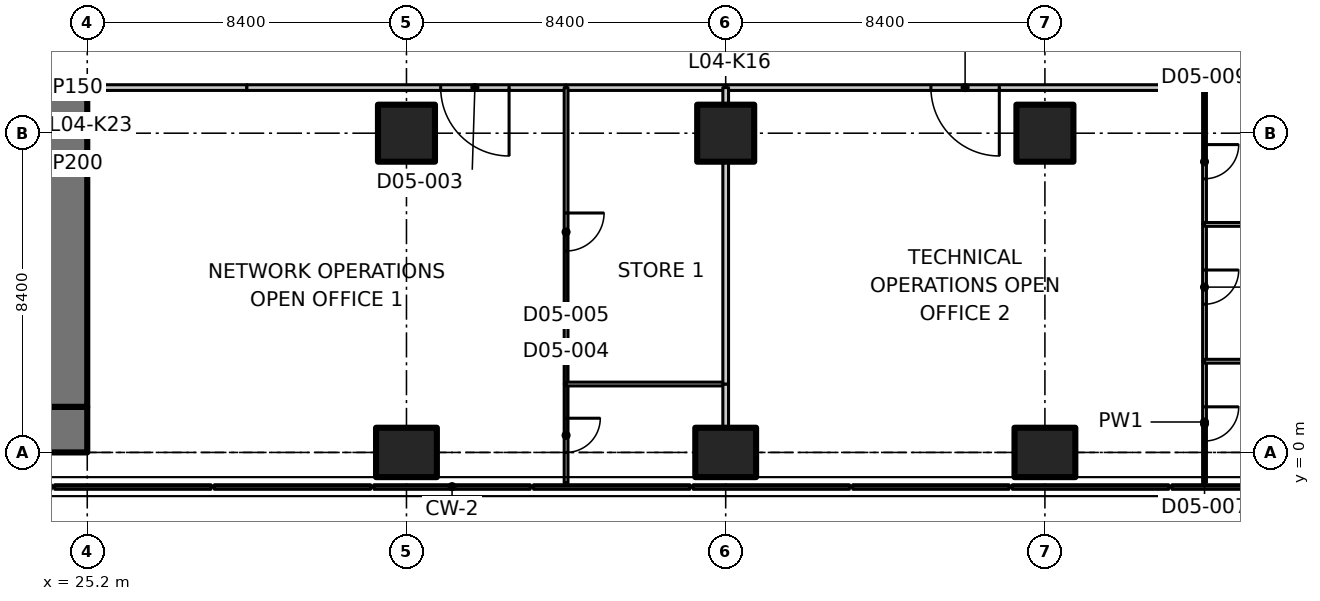
"""IFC4 building model, lengths in metres.
Left out: names, types, materials, properties, quantities, classifications, styles, units other than length and angle.
Written with IfcOpenShell. Run it as: python <this file> out.ifc"""

import sys

from ifc_helpers import new_model, si_unit, direction, frame, frame_2d, origin, origin_2d, place, context, subcontext, project, spatial, polyline, rectangle, outline, extrude, element, fill, save


model = new_model("IFC4")
c1 = context("Model", 3, precision=1e-05, world=origin(), true_north=direction((0.0, 1.0)))
c2 = subcontext(c1, "Body", "Model", "MODEL_VIEW")
j1 = project(units=[si_unit("LENGTHUNIT", "METRE"), si_unit("PLANEANGLEUNIT", "RADIAN")], contexts=[c1])
p1 = place(None, origin())
s1 = spatial("IfcSite", under=j1, at=p1, CompositionType="ELEMENT")
p2 = place(p1, origin())
s2 = spatial("IfcBuilding", under=s1, at=p2, CompositionType="ELEMENT")
p3 = place(p2, frame((0.0, 0.0, 27.5)))
s3 = spatial("IfcBuildingStorey", under=s2, at=p3, CompositionType="ELEMENT", Elevation=27.5)
p4 = place(p3, frame((33.6, 0.0, 0.0), z_axis=(0.0, 0.0, 1.0), x_axis=(0.0, 1.0, 0.0)))
e1 = element("IfcColumn", 1, at=p4, inside=s3, PredefinedType="COLUMN", context=c2, shape_type="SweptSolid", body=[
    extrude(rectangle(XDim=1.3, YDim=1.6, at=origin_2d()), origin(), (0.0, 0.0, 1.0), 4.25),
])
p5 = place(p3, frame((33.6, 8.4, 0.0), z_axis=(0.0, 0.0, 1.0), x_axis=(1.0, 0.0, 0.0)))
e2 = element("IfcColumn", 2, at=p5, inside=s3, PredefinedType="COLUMN", context=c2, shape_type="SweptSolid", body=[
    extrude(rectangle(XDim=1.5, YDim=1.5, at=origin_2d()), origin(), (0.0, 0.0, 1.0), 4.25),
])
p6 = place(p3, frame((42.0, 0.0, 0.0), z_axis=(0.0, 0.0, 1.0), x_axis=(0.0, 1.0, 0.0)))
e3 = element("IfcColumn", 3, at=p6, inside=s3, PredefinedType="COLUMN", context=c2, shape_type="SweptSolid", body=[
    extrude(rectangle(XDim=1.3, YDim=1.6, at=origin_2d()), origin(), (0.0, 0.0, 1.0), 4.25),
])
p7 = place(p3, frame((42.0, 8.4, 0.0), z_axis=(0.0, 0.0, 1.0), x_axis=(1.0, 0.0, 0.0)))
e4 = element("IfcColumn", 4, at=p7, inside=s3, PredefinedType="COLUMN", context=c2, shape_type="SweptSolid", body=[
    extrude(rectangle(XDim=1.5, YDim=1.5, at=origin_2d()), origin(), (0.0, 0.0, 1.0), 4.25),
])
p8 = place(p3, frame((50.4, 0.0, 0.0), z_axis=(0.0, 0.0, 1.0), x_axis=(0.0, 1.0, 0.0)))
e5 = element("IfcColumn", 5, at=p8, inside=s3, PredefinedType="COLUMN", context=c2, shape_type="SweptSolid", body=[
    extrude(rectangle(XDim=1.3, YDim=1.6, at=origin_2d()), origin(), (0.0, 0.0, 1.0), 4.25),
])
p9 = place(p3, frame((50.4, 8.4, 0.0), z_axis=(0.0, 0.0, 1.0), x_axis=(1.0, 0.0, 0.0)))
e6 = element("IfcColumn", 6, at=p9, inside=s3, PredefinedType="COLUMN", context=c2, shape_type="SweptSolid", body=[
    extrude(rectangle(XDim=1.5, YDim=1.5, at=origin_2d()), origin(), (0.0, 0.0, 1.0), 4.25),
])
p10 = place(p3, origin())
e7 = element("IfcWall", 7, at=p10, inside=s3, PredefinedType="SOLIDWALL", context=c2, shape_type="SweptSolid", body=[
    extrude(outline(polyline([(28.455, -0.97), (28.455, -0.85), (24.345, -0.85), (24.345, -0.97), (28.455, -0.97)])), origin(), (0.0, 0.0, 1.0), 4.25),
])
p11 = place(p3, origin())
e8 = element("IfcWall", 8, at=p11, inside=s3, PredefinedType="SOLIDWALL", context=c2, shape_type="SweptSolid", body=[
    extrude(outline(polyline([(32.655, -0.97), (32.655, -0.85), (28.545, -0.85), (28.545, -0.97), (32.655, -0.97)])), origin(), (0.0, 0.0, 1.0), 4.25),
])
p12 = place(p3, origin())
e9 = element("IfcWall", 9, at=p12, inside=s3, PredefinedType="SOLIDWALL", context=c2, shape_type="SweptSolid", body=[
    extrude(outline(polyline([(36.855, -0.97), (36.855, -0.85), (32.745, -0.85), (32.745, -0.97), (36.855, -0.97)])), origin(), (0.0, 0.0, 1.0), 4.25),
])
p13 = place(p3, origin())
e10 = element("IfcWall", 10, at=p13, inside=s3, PredefinedType="SOLIDWALL", context=c2, shape_type="SweptSolid", body=[
    extrude(outline(polyline([(41.055, -0.97), (41.055, -0.85), (36.945, -0.85), (36.945, -0.97), (41.055, -0.97)])), origin(), (0.0, 0.0, 1.0), 4.25),
])
p14 = place(p3, origin())
e11 = element("IfcWall", 11, at=p14, inside=s3, PredefinedType="SOLIDWALL", context=c2, shape_type="SweptSolid", body=[
    extrude(outline(polyline([(45.255, -0.97), (45.255, -0.85), (41.145, -0.85), (41.145, -0.97), (45.255, -0.97)])), origin(), (0.0, 0.0, 1.0), 4.25),
])
p15 = place(p3, origin())
e12 = element("IfcWall", 12, at=p15, inside=s3, PredefinedType="SOLIDWALL", context=c2, shape_type="SweptSolid", body=[
    extrude(outline(polyline([(49.455, -0.97), (49.455, -0.85), (45.345, -0.85), (45.345, -0.97), (49.455, -0.97)])), origin(), (0.0, 0.0, 1.0), 4.25),
])
p16 = place(p3, origin())
e13 = element("IfcWall", 13, at=p16, inside=s3, PredefinedType="SOLIDWALL", context=c2, shape_type="SweptSolid", body=[
    extrude(outline(polyline([(53.655, -0.97), (53.655, -0.85), (49.545, -0.85), (49.545, -0.97), (53.655, -0.97)])), origin(), (0.0, 0.0, 1.0), 4.25),
])
p17 = place(p3, origin())
e14 = element("IfcWall", 14, at=p17, inside=s3, PredefinedType="SOLIDWALL", context=c2, shape_type="SweptSolid", body=[
    extrude(outline(polyline([(57.855, -0.97), (57.855, -0.85), (53.745, -0.85), (53.745, -0.97), (57.855, -0.97)])), origin(), (0.0, 0.0, 1.0), 4.25),
])
p18 = place(p3, frame((6.736, 0.6, 0.0), z_axis=(0.0, 0.0, 1.0), x_axis=(1.0, 0.0, 0.0)))
e15 = element("IfcWall", 15, at=p18, inside=s3, PredefinedType="SHEAR", context=c2, shape_type="SweptSolid", body=[
    extrude(rectangle(XDim=18.464, YDim=1.2, at=frame_2d((9.232, 0.0))), origin(), (0.0, 0.0, 1.0), 4.25),
])
p19 = place(p3, frame((24.6, 1.2, 0.0), z_axis=(0.0, 0.0, 1.0), x_axis=(0.0, 1.0, 0.0)))
e16 = element("IfcWall", 16, at=p19, inside=s3, PredefinedType="SHEAR", context=c2, shape_type="SweptSolid", body=[
    extrude(rectangle(XDim=8.6, YDim=1.2, at=frame_2d((4.3, 0.0))), origin(), (0.0, 0.0, 1.0), 4.25),
])
p20 = place(p3, frame((29.4, 9.6, 0.0), z_axis=(0.0, 0.0, 1.0), x_axis=(-1.0, 0.0, 0.0)))
e17 = element("IfcWall", 17, at=p20, inside=s3, PredefinedType="PARTITIONING", context=c2, shape_type="SweptSolid", body=[
    extrude(rectangle(XDim=4.2, YDim=0.15, at=frame_2d((2.1, 0.0))), origin(), (0.0, 0.0, 1.0), 4.23),
])
p21 = place(p3, frame((37.8, 9.6, 0.0), z_axis=(0.0, 0.0, 1.0), x_axis=(-1.0, 0.0, 0.0)))
e18 = element("IfcWall", 18, at=p21, inside=s3, PredefinedType="PARTITIONING", context=c2, shape_type="SweptSolid", body=[
    extrude(rectangle(XDim=8.4, YDim=0.15, at=frame_2d((4.2, 0.0))), origin(), (0.0, 0.0, 1.0), 4.23),
])
p22 = place(p21, frame((1.5, 0.0, 0.0)))
e19 = element("IfcOpeningElement", 19, at=p22, cuts=e18, PredefinedType="OPENING", context=c2, shape_type="SweptSolid", body=[
    extrude(rectangle(XDim=1.8, YDim=2.1, at=frame_2d((0.9, 1.05))), frame((0.0, 0.085, 0.0), z_axis=(0.0, -1.0, 0.0), x_axis=(1.0, 0.0, 0.0)), (0.0, 0.0, 1.0), 0.17),
])
p23 = place(p3, frame((42.0, 9.6, 0.0), z_axis=(0.0, 0.0, 1.0), x_axis=(-1.0, 0.0, 0.0)))
e20 = element("IfcWall", 20, at=p23, inside=s3, PredefinedType="PARTITIONING", context=c2, shape_type="SweptSolid", body=[
    extrude(rectangle(XDim=4.2, YDim=0.15, at=frame_2d((2.1, 0.0))), origin(), (0.0, 0.0, 1.0), 4.23),
])
p24 = place(p3, frame((54.6, 9.6, 0.0), z_axis=(0.0, 0.0, 1.0), x_axis=(-1.0, 0.0, 0.0)))
e21 = element("IfcWall", 21, at=p24, inside=s3, PredefinedType="PARTITIONING", context=c2, shape_type="SweptSolid", body=[
    extrude(rectangle(XDim=12.6, YDim=0.15, at=frame_2d((6.3, 0.0))), origin(), (0.0, 0.0, 1.0), 4.23),
])
p25 = place(p24, frame((5.4, 0.0, 0.0)))
e22 = element("IfcOpeningElement", 22, at=p25, cuts=e21, PredefinedType="OPENING", context=c2, shape_type="SweptSolid", body=[
    extrude(rectangle(XDim=1.8, YDim=2.1, at=frame_2d((0.9, 1.05))), frame((0.0, 0.085, 0.0), z_axis=(0.0, -1.0, 0.0), x_axis=(1.0, 0.0, 0.0)), (0.0, 0.0, 1.0), 0.17),
])
p26 = place(p3, frame((58.0, 9.6, 0.0), z_axis=(0.0, 0.0, 1.0), x_axis=(-1.0, 0.0, 0.0)))
e23 = element("IfcWall", 23, at=p26, inside=s3, PredefinedType="PARTITIONING", context=c2, shape_type="SweptSolid", body=[
    extrude(rectangle(XDim=3.4, YDim=0.15, at=frame_2d((1.7, 0.0))), origin(), (0.0, 0.0, 1.0), 4.23),
])
p27 = place(p3, frame((37.8, 1.8, 0.0), z_axis=(0.0, 0.0, 1.0), x_axis=(0.0, -1.0, 0.0)))
e24 = element("IfcWall", 24, at=p27, inside=s3, PredefinedType="PARTITIONING", context=c2, shape_type="SweptSolid", body=[
    extrude(rectangle(XDim=2.598, YDim=0.1, at=frame_2d((1.299, 0.0))), origin(), (0.0, 0.0, 1.0), 3.88),
])
p28 = place(p27, frame((0.9, 0.0, 0.0)))
e25 = element("IfcOpeningElement", 25, at=p28, cuts=e24, PredefinedType="OPENING", context=c2, shape_type="SweptSolid", body=[
    extrude(rectangle(XDim=0.9, YDim=2.1, at=frame_2d((0.45, 1.05))), frame((0.0, 0.06, 0.0), z_axis=(0.0, -1.0, 0.0), x_axis=(1.0, 0.0, 0.0)), (0.0, 0.0, 1.0), 0.12),
])
p29 = place(p3, frame((37.8, 9.6, 0.0), z_axis=(0.0, 0.0, 1.0), x_axis=(0.0, -1.0, 0.0)))
e26 = element("IfcWall", 26, at=p29, inside=s3, PredefinedType="PARTITIONING", context=c2, shape_type="SweptSolid", body=[
    extrude(rectangle(XDim=7.8, YDim=0.1, at=frame_2d((3.9, 0.0))), origin(), (0.0, 0.0, 1.0), 4.23),
])
p30 = place(p29, frame((3.3, 0.0, 0.0)))
e27 = element("IfcOpeningElement", 27, at=p30, cuts=e26, PredefinedType="OPENING", context=c2, shape_type="SweptSolid", body=[
    extrude(rectangle(XDim=1.0, YDim=2.1, at=frame_2d((0.5, 1.05))), frame((0.0, 0.06, 0.0), z_axis=(0.0, -1.0, 0.0), x_axis=(1.0, 0.0, 0.0)), (0.0, 0.0, 1.0), 0.12),
])
p31 = place(p3, frame((37.8, 1.8, 0.0), z_axis=(0.0, 0.0, 1.0), x_axis=(1.0, 0.0, 0.0)))
e28 = element("IfcWall", 28, at=p31, inside=s3, PredefinedType="PARTITIONING", context=c2, shape_type="SweptSolid", body=[
    extrude(rectangle(XDim=4.2, YDim=0.1, at=frame_2d((2.1, 0.0))), origin(), (0.0, 0.0, 1.0), 4.23),
])
p32 = place(p3, frame((42.0, 1.8, 0.0), z_axis=(0.0, 0.0, 1.0), x_axis=(0.0, -1.0, 0.0)))
e29 = element("IfcWall", 29, at=p32, inside=s3, PredefinedType="PARTITIONING", context=c2, shape_type="SweptSolid", body=[
    extrude(rectangle(XDim=1.13, YDim=0.15, at=frame_2d((0.565, 0.0))), origin(), (0.0, 0.0, 1.0), 4.23),
])
p33 = place(p3, frame((42.0, 9.6, 0.0), z_axis=(0.0, 0.0, 1.0), x_axis=(0.0, -1.0, 0.0)))
e30 = element("IfcWall", 30, at=p33, inside=s3, PredefinedType="PARTITIONING", context=c2, shape_type="SweptSolid", body=[
    extrude(rectangle(XDim=0.43, YDim=0.15, at=frame_2d((0.215, 0.0))), origin(), (0.0, 0.0, 1.0), 4.23),
])
p34 = place(p3, frame((42.0, 7.63, 0.0), z_axis=(0.0, 0.0, 1.0), x_axis=(0.0, -1.0, 0.0)))
e31 = element("IfcWall", 31, at=p34, inside=s3, PredefinedType="PARTITIONING", context=c2, shape_type="SweptSolid", body=[
    extrude(rectangle(XDim=5.83, YDim=0.15, at=frame_2d((2.915, 0.0))), origin(), (0.0, 0.0, 1.0), 4.23),
])
p35 = place(p3, frame((54.6, 2.4, 0.0), z_axis=(0.0, 0.0, 1.0), x_axis=(0.0, -1.0, 0.0)))
e32 = element("IfcWall", 32, at=p35, inside=s3, PredefinedType="PARTITIONING", context=c2, shape_type="SweptSolid", body=[
    extrude(rectangle(XDim=3.198, YDim=0.1, at=frame_2d((1.599, 0.0))), origin(), (0.0, 0.0, 1.0), 3.88),
])
p36 = place(p35, frame((1.2, 0.0, 0.0)))
e33 = element("IfcOpeningElement", 33, at=p36, cuts=e32, PredefinedType="OPENING", context=c2, shape_type="SweptSolid", body=[
    extrude(rectangle(XDim=0.9, YDim=2.1, at=frame_2d((0.45, 1.05))), frame((0.0, 0.06, 0.0), z_axis=(0.0, -1.0, 0.0), x_axis=(1.0, 0.0, 0.0)), (0.0, 0.0, 1.0), 0.12),
])
p37 = place(p3, frame((54.6, 6.0, 0.0), z_axis=(0.0, 0.0, 1.0), x_axis=(0.0, -1.0, 0.0)))
e34 = element("IfcWall", 34, at=p37, inside=s3, PredefinedType="PARTITIONING", context=c2, shape_type="SweptSolid", body=[
    extrude(rectangle(XDim=3.6, YDim=0.1, at=frame_2d((1.8, 0.0))), origin(), (0.0, 0.0, 1.0), 4.23),
])
p38 = place(p37, frame((1.2, 0.0, 0.0)))
e35 = element("IfcOpeningElement", 35, at=p38, cuts=e34, PredefinedType="OPENING", context=c2, shape_type="SweptSolid", body=[
    extrude(rectangle(XDim=0.9, YDim=2.1, at=frame_2d((0.45, 1.05))), frame((0.0, 0.06, 0.0), z_axis=(0.0, -1.0, 0.0), x_axis=(1.0, 0.0, 0.0)), (0.0, 0.0, 1.0), 0.12),
])
p39 = place(p3, frame((54.6, 9.6, 0.0), z_axis=(0.0, 0.0, 1.0), x_axis=(0.0, -1.0, 0.0)))
e36 = element("IfcWall", 36, at=p39, inside=s3, PredefinedType="PARTITIONING", context=c2, shape_type="SweptSolid", body=[
    extrude(rectangle(XDim=3.6, YDim=0.1, at=frame_2d((1.8, 0.0))), origin(), (0.0, 0.0, 1.0), 4.23),
])
p40 = place(p39, frame((1.5, 0.0, 0.0)))
e37 = element("IfcOpeningElement", 37, at=p40, cuts=e36, PredefinedType="OPENING", context=c2, shape_type="SweptSolid", body=[
    extrude(rectangle(XDim=0.9, YDim=2.1, at=frame_2d((0.45, 1.05))), frame((0.0, 0.06, 0.0), z_axis=(0.0, -1.0, 0.0), x_axis=(1.0, 0.0, 0.0)), (0.0, 0.0, 1.0), 0.12),
])
for number, where, z_axis, x_axis in (
    (38, (54.6, 2.4, 0.0), (0.0, 0.0, 1.0), (1.0, 0.0, 0.0)),
    (39, (54.6, 6.0, 0.0), (0.0, 0.0, 1.0), (1.0, 0.0, 0.0)),
):
    element("IfcWall", number, at=place(p3, frame(where, z_axis=z_axis, x_axis=x_axis)), inside=s3, PredefinedType="PARTITIONING", context=c2, shape_type="SweptSolid", body=[
        extrude(rectangle(XDim=3.4, YDim=0.1, at=frame_2d((1.7, 0.0))), origin(), (0.0, 0.0, 1.0), 4.23),
    ])
p41 = place(p22, origin())
e40 = element("IfcDoor", 40, at=p41, inside=s3, OperationType="DOUBLE_DOOR_SINGLE_SWING", PredefinedType="DOOR", context=c2, shape_type="SweptSolid", body=[
    extrude(rectangle(XDim=1.8, YDim=2.1, at=frame_2d((0.9, 1.05))), frame((0.0, 0.025, 0.0), z_axis=(0.0, -1.0, 0.0), x_axis=(1.0, 0.0, 0.0)), (0.0, 0.0, 1.0), 0.05),
])
fill(e19, e40)
p42 = place(p28, origin())
e41 = element("IfcDoor", 41, at=p42, inside=s3, OperationType="SINGLE_SWING_LEFT", PredefinedType="DOOR", context=c2, shape_type="SweptSolid", body=[
    extrude(rectangle(XDim=0.9, YDim=2.1, at=frame_2d((0.45, 1.05))), frame((0.0, 0.025, 0.0), z_axis=(0.0, -1.0, 0.0), x_axis=(1.0, 0.0, 0.0)), (0.0, 0.0, 1.0), 0.05),
])
fill(e25, e41)
p43 = place(p30, origin())
e42 = element("IfcDoor", 42, at=p43, inside=s3, OperationType="SINGLE_SWING_LEFT", PredefinedType="DOOR", context=c2, shape_type="SweptSolid", body=[
    extrude(rectangle(XDim=1.0, YDim=2.1, at=frame_2d((0.5, 1.05))), frame((0.0, 0.025, 0.0), z_axis=(0.0, -1.0, 0.0), x_axis=(1.0, 0.0, 0.0)), (0.0, 0.0, 1.0), 0.05),
])
fill(e27, e42)
p44 = place(p25, origin())
e43 = element("IfcDoor", 43, at=p44, inside=s3, OperationType="DOUBLE_DOOR_SINGLE_SWING", PredefinedType="DOOR", context=c2, shape_type="SweptSolid", body=[
    extrude(rectangle(XDim=1.8, YDim=2.1, at=frame_2d((0.9, 1.05))), frame((0.0, 0.025, 0.0), z_axis=(0.0, -1.0, 0.0), x_axis=(1.0, 0.0, 0.0)), (0.0, 0.0, 1.0), 0.05),
])
fill(e22, e43)
p45 = place(p36, origin())
e44 = element("IfcDoor", 44, at=p45, inside=s3, OperationType="SINGLE_SWING_LEFT", PredefinedType="DOOR", context=c2, shape_type="SweptSolid", body=[
    extrude(rectangle(XDim=0.9, YDim=2.1, at=frame_2d((0.45, 1.05))), frame((0.0, 0.025, 0.0), z_axis=(0.0, -1.0, 0.0), x_axis=(1.0, 0.0, 0.0)), (0.0, 0.0, 1.0), 0.05),
])
fill(e33, e44)
p46 = place(p38, origin())
e45 = element("IfcDoor", 45, at=p46, inside=s3, OperationType="SINGLE_SWING_LEFT", PredefinedType="DOOR", context=c2, shape_type="SweptSolid", body=[
    extrude(rectangle(XDim=0.9, YDim=2.1, at=frame_2d((0.45, 1.05))), frame((0.0, 0.025, 0.0), z_axis=(0.0, -1.0, 0.0), x_axis=(1.0, 0.0, 0.0)), (0.0, 0.0, 1.0), 0.05),
])
fill(e35, e45)
p47 = place(p40, origin())
e46 = element("IfcDoor", 46, at=p47, inside=s3, OperationType="SINGLE_SWING_LEFT", PredefinedType="DOOR", context=c2, shape_type="SweptSolid", body=[
    extrude(rectangle(XDim=0.9, YDim=2.1, at=frame_2d((0.45, 1.05))), frame((0.0, 0.025, 0.0), z_axis=(0.0, -1.0, 0.0), x_axis=(1.0, 0.0, 0.0)), (0.0, 0.0, 1.0), 0.05),
])
fill(e37, e46)
save(model, sys.argv[1])
